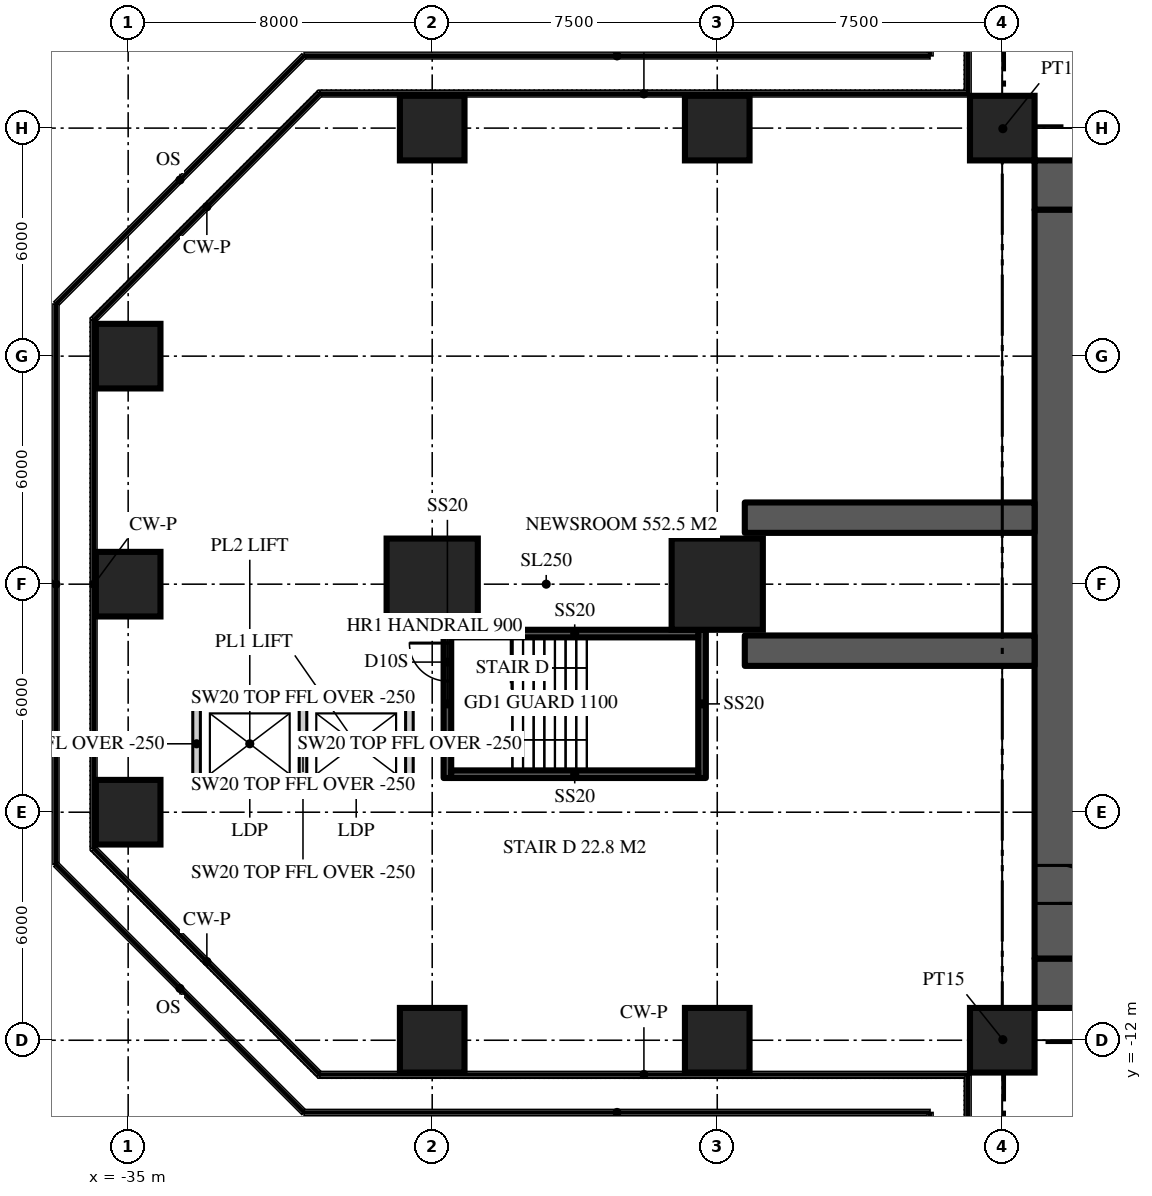
"""IFC4 building model, lengths in metres.
Left out: names, types, materials, properties, quantities, classifications, styles, units other than length and angle.
Written with IfcOpenShell. Run it as: python <this file> out.ifc"""

import sys

from ifc_helpers import new_model, si_unit, direction, frame, frame_2d, origin, origin_2d, place, context, subcontext, project, spatial, rectangle, extrude, element, fill, save


model = new_model("IFC4")
c1 = context("Model", 3, precision=1e-05, world=origin(), true_north=direction((0.0, 1.0)))
c2 = subcontext(c1, "Body", "Model", "MODEL_VIEW")
j1 = project(units=[si_unit("LENGTHUNIT", "METRE"), si_unit("PLANEANGLEUNIT", "RADIAN")], contexts=[c1])
p1 = place(None, origin())
s1 = spatial("IfcSite", under=j1, at=p1, CompositionType="ELEMENT")
p2 = place(p1, origin())
s2 = spatial("IfcBuilding", under=s1, at=p2, CompositionType="ELEMENT")
p3 = place(p2, frame((0.0, 0.0, 28.0)))
s3 = spatial("IfcBuildingStorey", under=s2, at=p3, CompositionType="ELEMENT", Elevation=28.0)
p4 = place(p3, frame((-11.15, 10.5, 0.0), z_axis=(0.0, 0.0, 1.0), x_axis=(1.0, 0.0, 0.0)))
e1 = element("IfcWall", 1, at=p4, inside=s3, PredefinedType="SHEAR", context=c2, shape_type="SweptSolid", body=[
    extrude(rectangle(XDim=22.3, YDim=1.3, at=frame_2d((11.15, 0.0))), origin(), (0.0, 0.0, 1.0), 5.0),
])
p5 = place(p4, frame((4.25, 0.0, 0.0)))
e2 = element("IfcOpeningElement", 2, at=p5, cuts=e1, PredefinedType="OPENING", context=c2, shape_type="SweptSolid", body=[
    extrude(rectangle(XDim=1.8, YDim=2.2, at=frame_2d((0.9, 1.1))), frame((0.0, 0.66, 0.0), z_axis=(0.0, -1.0, 0.0), x_axis=(1.0, 0.0, 0.0)), (0.0, 0.0, 1.0), 1.32),
])
p6 = place(p4, frame((16.25, 0.0, 0.0)))
e3 = element("IfcOpeningElement", 3, at=p6, cuts=e1, PredefinedType="OPENING", context=c2, shape_type="SweptSolid", body=[
    extrude(rectangle(XDim=1.8, YDim=2.2, at=frame_2d((0.9, 1.1))), frame((0.0, 0.66, 0.0), z_axis=(0.0, -1.0, 0.0), x_axis=(1.0, 0.0, 0.0)), (0.0, 0.0, 1.0), 1.32),
])
p7 = place(p3, frame((11.15, -10.5, 0.0), z_axis=(0.0, 0.0, 1.0), x_axis=(-1.0, 0.0, 0.0)))
e4 = element("IfcWall", 4, at=p7, inside=s3, PredefinedType="SHEAR", context=c2, shape_type="SweptSolid", body=[
    extrude(rectangle(XDim=22.3, YDim=1.3, at=frame_2d((11.15, 0.0))), origin(), (0.0, 0.0, 1.0), 5.0),
])
p8 = place(p7, frame((16.25, 0.0, 0.0)))
e5 = element("IfcOpeningElement", 5, at=p8, cuts=e4, PredefinedType="OPENING", context=c2, shape_type="SweptSolid", body=[
    extrude(rectangle(XDim=1.8, YDim=2.2, at=frame_2d((0.9, 1.1))), frame((0.0, 0.66, 0.0), z_axis=(0.0, -1.0, 0.0), x_axis=(1.0, 0.0, 0.0)), (0.0, 0.0, 1.0), 1.32),
])
p9 = place(p7, frame((4.25, 0.0, 0.0)))
e6 = element("IfcOpeningElement", 6, at=p9, cuts=e4, PredefinedType="OPENING", context=c2, shape_type="SweptSolid", body=[
    extrude(rectangle(XDim=1.8, YDim=2.2, at=frame_2d((0.9, 1.1))), frame((0.0, 0.66, 0.0), z_axis=(0.0, -1.0, 0.0), x_axis=(1.0, 0.0, 0.0)), (0.0, 0.0, 1.0), 1.32),
])
p10 = place(p3, frame((-10.5, 9.85, 0.0), z_axis=(0.0, 0.0, 1.0), x_axis=(0.0, -1.0, 0.0)))
e7 = element("IfcWall", 7, at=p10, inside=s3, PredefinedType="SHEAR", context=c2, shape_type="SweptSolid", body=[
    extrude(rectangle(XDim=19.7, YDim=1.3, at=frame_2d((9.85, 0.0))), origin(), (0.0, 0.0, 1.0), 5.0),
])
p11 = place(p10, frame((17.25, 0.0, 0.0)))
e8 = element("IfcOpeningElement", 8, at=p11, cuts=e7, PredefinedType="OPENING", context=c2, shape_type="SweptSolid", body=[
    extrude(rectangle(XDim=1.0, YDim=2.2, at=frame_2d((0.5, 1.1))), frame((0.0, 0.66, 0.0), z_axis=(0.0, -1.0, 0.0), x_axis=(1.0, 0.0, 0.0)), (0.0, 0.0, 1.0), 1.32),
])
for number, where, z_axis, x_axis in (
    (9, (-11.15, 1.75, 0.0), (0.0, 0.0, 1.0), (-1.0, 0.0, 0.0)),
    (10, (-11.15, -1.75, 0.0), (0.0, 0.0, 1.0), (-1.0, 0.0, 0.0)),
):
    element("IfcWall", number, at=place(p3, frame(where, z_axis=z_axis, x_axis=x_axis)), inside=s3, PredefinedType="SHEAR", context=c2, shape_type="SweptSolid", body=[
        extrude(rectangle(XDim=7.625, YDim=0.8, at=frame_2d((3.812, 0.0))), origin(), (0.0, 0.0, 1.0), 5.0),
    ])
for number, where, z_axis, x_axis in (
    (11, (-27.0, -12.0, 0.0), (0.0, 0.0, 1.0), (1.0, 0.0, 0.0)),
    (12, (-19.5, -12.0, 0.0), (0.0, 0.0, 1.0), (1.0, 0.0, 0.0)),
    (13, (-12.0, -12.0, 0.0), (0.0, 0.0, 1.0), (1.0, 0.0, 0.0)),
    (14, (-35.0, -6.0, 0.0), (0.0, 0.0, 1.0), (1.0, 0.0, 0.0)),
    (15, (-35.0, 0.0, 0.0), (0.0, 0.0, 1.0), (1.0, 0.0, 0.0)),
):
    element("IfcColumn", number, at=place(p3, frame(where, z_axis=z_axis, x_axis=x_axis)), inside=s3, PredefinedType="COLUMN", context=c2, shape_type="SweptSolid", body=[
        extrude(rectangle(XDim=1.7, YDim=1.7, at=origin_2d()), origin(), (0.0, 0.0, 1.0), 5.0),
    ])
for number, where, z_axis, x_axis in (
    (16, (-27.0, 0.0, 0.0), (0.0, 0.0, 1.0), (1.0, 0.0, 0.0)),
    (17, (-19.5, 0.0, 0.0), (0.0, 0.0, 1.0), (1.0, 0.0, 0.0)),
):
    element("IfcColumn", number, at=place(p3, frame(where, z_axis=z_axis, x_axis=x_axis)), inside=s3, PredefinedType="COLUMN", context=c2, shape_type="SweptSolid", body=[
        extrude(rectangle(XDim=2.4, YDim=2.4, at=origin_2d()), origin(), (0.0, 0.0, 1.0), 5.0),
    ])
for number, where, z_axis, x_axis in (
    (18, (-35.0, 6.0, 0.0), (0.0, 0.0, 1.0), (1.0, 0.0, 0.0)),
    (19, (-27.0, 12.0, 0.0), (0.0, 0.0, 1.0), (1.0, 0.0, 0.0)),
    (20, (-19.5, 12.0, 0.0), (0.0, 0.0, 1.0), (1.0, 0.0, 0.0)),
    (21, (-12.0, 12.0, 0.0), (0.0, 0.0, 1.0), (1.0, 0.0, 0.0)),
):
    element("IfcColumn", number, at=place(p3, frame(where, z_axis=z_axis, x_axis=x_axis)), inside=s3, PredefinedType="COLUMN", context=c2, shape_type="SweptSolid", body=[
        extrude(rectangle(XDim=1.7, YDim=1.7, at=origin_2d()), origin(), (0.0, 0.0, 1.0), 5.0),
    ])
for number, where, z_axis, x_axis in (
    (22, (-11.15, 11.15, 0.0), (0.0, 0.0, 1.0), (-0.707, 0.707, 0.0)),
    (23, (-11.15, -11.15, 0.0), (0.0, 0.0, 1.0), (-0.707, -0.707, 0.0)),
):
    element("IfcWall", number, at=place(p3, frame(where, z_axis=z_axis, x_axis=x_axis)), inside=s3, PredefinedType="PARTITIONING", context=c2, shape_type="SweptSolid", body=[
        extrude(rectangle(XDim=2.362, YDim=0.15, at=frame_2d((1.181, 0.0))), origin(), (0.0, 0.0, 1.0), 4.75),
    ])
p12 = place(p3, frame((-27.5, -3.0, 0.0), z_axis=(0.0, 0.0, 1.0), x_axis=(-1.0, 0.0, 0.0)))
e24 = element("IfcWall", 24, at=p12, inside=s3, PredefinedType="SOLIDWALL", context=c2, shape_type="SweptSolid", body=[
    extrude(rectangle(XDim=5.8, YDim=0.2, at=frame_2d((2.9, 0.0))), origin(), (0.0, 0.0, 1.0), 4.75),
])
p13 = place(p3, frame((-33.3, -5.4, 0.0), z_axis=(0.0, 0.0, 1.0), x_axis=(1.0, 0.0, 0.0)))
e25 = element("IfcWall", 25, at=p13, inside=s3, PredefinedType="SOLIDWALL", context=c2, shape_type="SweptSolid", body=[
    extrude(rectangle(XDim=5.8, YDim=0.2, at=frame_2d((2.9, 0.0))), origin(), (0.0, 0.0, 1.0), 4.75),
])
p14 = place(p13, frame((3.75, 0.0, 0.0)))
e26 = element("IfcOpeningElement", 26, at=p14, cuts=e25, PredefinedType="OPENING", context=c2, shape_type="SweptSolid", body=[
    extrude(rectangle(XDim=1.1, YDim=2.2, at=frame_2d((0.55, 1.1))), frame((0.0, 0.11, 0.0), z_axis=(0.0, -1.0, 0.0), x_axis=(1.0, 0.0, 0.0)), (0.0, 0.0, 1.0), 0.22),
])
p15 = place(p13, frame((0.95, 0.0, 0.0)))
e27 = element("IfcOpeningElement", 27, at=p15, cuts=e25, PredefinedType="OPENING", context=c2, shape_type="SweptSolid", body=[
    extrude(rectangle(XDim=1.1, YDim=2.2, at=frame_2d((0.55, 1.1))), frame((0.0, 0.11, 0.0), z_axis=(0.0, -1.0, 0.0), x_axis=(1.0, 0.0, 0.0)), (0.0, 0.0, 1.0), 0.22),
])
for number, where, z_axis, x_axis in (
    (28, (-27.6, -3.1, 0.0), (0.0, 0.0, 1.0), (0.0, -1.0, 0.0)),
    (29, (-30.4, -3.1, 0.0), (0.0, 0.0, 1.0), (0.0, -1.0, 0.0)),
    (30, (-33.2, -3.1, 0.0), (0.0, 0.0, 1.0), (0.0, -1.0, 0.0)),
):
    element("IfcWall", number, at=place(p3, frame(where, z_axis=z_axis, x_axis=x_axis)), inside=s3, PredefinedType="SOLIDWALL", context=c2, shape_type="SweptSolid", body=[
        extrude(rectangle(XDim=2.2, YDim=0.2, at=frame_2d((1.1, 0.0))), origin(), (0.0, 0.0, 1.0), 4.75),
    ])
p16 = place(p3, frame((-19.9, -1.2, 0.0), z_axis=(0.0, 0.0, 1.0), x_axis=(0.0, -1.0, 0.0)))
e31 = element("IfcWall", 31, at=p16, inside=s3, PredefinedType="SOLIDWALL", context=c2, shape_type="SweptSolid", body=[
    extrude(rectangle(XDim=3.9, YDim=0.2, at=frame_2d((1.95, 0.0))), origin(), (0.0, 0.0, 1.0), 4.75),
])
p17 = place(p3, frame((-26.6, -5.1, 0.0), z_axis=(0.0, 0.0, 1.0), x_axis=(0.0, 1.0, 0.0)))
e32 = element("IfcWall", 32, at=p17, inside=s3, PredefinedType="SOLIDWALL", context=c2, shape_type="SweptSolid", body=[
    extrude(rectangle(XDim=3.9, YDim=0.2, at=frame_2d((1.95, 0.0))), origin(), (0.0, 0.0, 1.0), 4.75),
])
p18 = place(p17, frame((2.55, 0.0, 0.0)))
e33 = element("IfcOpeningElement", 33, at=p18, cuts=e32, PredefinedType="OPENING", context=c2, shape_type="SweptSolid", body=[
    extrude(rectangle(XDim=1.0, YDim=2.2, at=frame_2d((0.5, 1.1))), frame((0.0, 0.11, 0.0), z_axis=(0.0, -1.0, 0.0), x_axis=(1.0, 0.0, 0.0)), (0.0, 0.0, 1.0), 0.22),
])
for number, where, z_axis, x_axis in (
    (34, (-20.0, -1.3, 0.0), (0.0, 0.0, 1.0), (-1.0, 0.0, 0.0)),
    (35, (-26.5, -5.0, 0.0), (0.0, 0.0, 1.0), (1.0, 0.0, 0.0)),
):
    element("IfcWall", number, at=place(p3, frame(where, z_axis=z_axis, x_axis=x_axis)), inside=s3, PredefinedType="SOLIDWALL", context=c2, shape_type="SweptSolid", body=[
        extrude(rectangle(XDim=6.5, YDim=0.2, at=frame_2d((3.25, 0.0))), origin(), (0.0, 0.0, 1.0), 4.75),
    ])
p19 = place(p14, origin())
e36 = element("IfcDoor", 36, at=p19, inside=s3, OperationType="SLIDING_TO_LEFT", PredefinedType="DOOR", context=c2, shape_type="SweptSolid", body=[
    extrude(rectangle(XDim=1.1, YDim=2.2, at=frame_2d((0.55, 1.1))), frame((0.0, 0.025, 0.0), z_axis=(0.0, -1.0, 0.0), x_axis=(1.0, 0.0, 0.0)), (0.0, 0.0, 1.0), 0.05),
])
fill(e26, e36)
p20 = place(p15, origin())
e37 = element("IfcDoor", 37, at=p20, inside=s3, OperationType="SLIDING_TO_LEFT", PredefinedType="DOOR", context=c2, shape_type="SweptSolid", body=[
    extrude(rectangle(XDim=1.1, YDim=2.2, at=frame_2d((0.55, 1.1))), frame((0.0, 0.025, 0.0), z_axis=(0.0, -1.0, 0.0), x_axis=(1.0, 0.0, 0.0)), (0.0, 0.0, 1.0), 0.05),
])
fill(e27, e37)
p21 = place(p11, origin())
e38 = element("IfcDoor", 38, at=p21, inside=s3, OperationType="SINGLE_SWING_RIGHT", PredefinedType="DOOR", context=c2, shape_type="SweptSolid", body=[
    extrude(rectangle(XDim=1.0, YDim=2.2, at=frame_2d((0.5, 1.1))), frame((0.0, 0.025, 0.0), z_axis=(0.0, -1.0, 0.0), x_axis=(1.0, 0.0, 0.0)), (0.0, 0.0, 1.0), 0.05),
])
fill(e8, e38)
p22 = place(p18, origin())
e39 = element("IfcDoor", 39, at=p22, inside=s3, OperationType="SINGLE_SWING_RIGHT", PredefinedType="DOOR", context=c2, shape_type="SweptSolid", body=[
    extrude(rectangle(XDim=1.0, YDim=2.2, at=frame_2d((0.5, 1.1))), frame((0.0, 0.025, 0.0), z_axis=(0.0, -1.0, 0.0), x_axis=(1.0, 0.0, 0.0)), (0.0, 0.0, 1.0), 0.05),
])
fill(e33, e39)
save(model, sys.argv[1])
